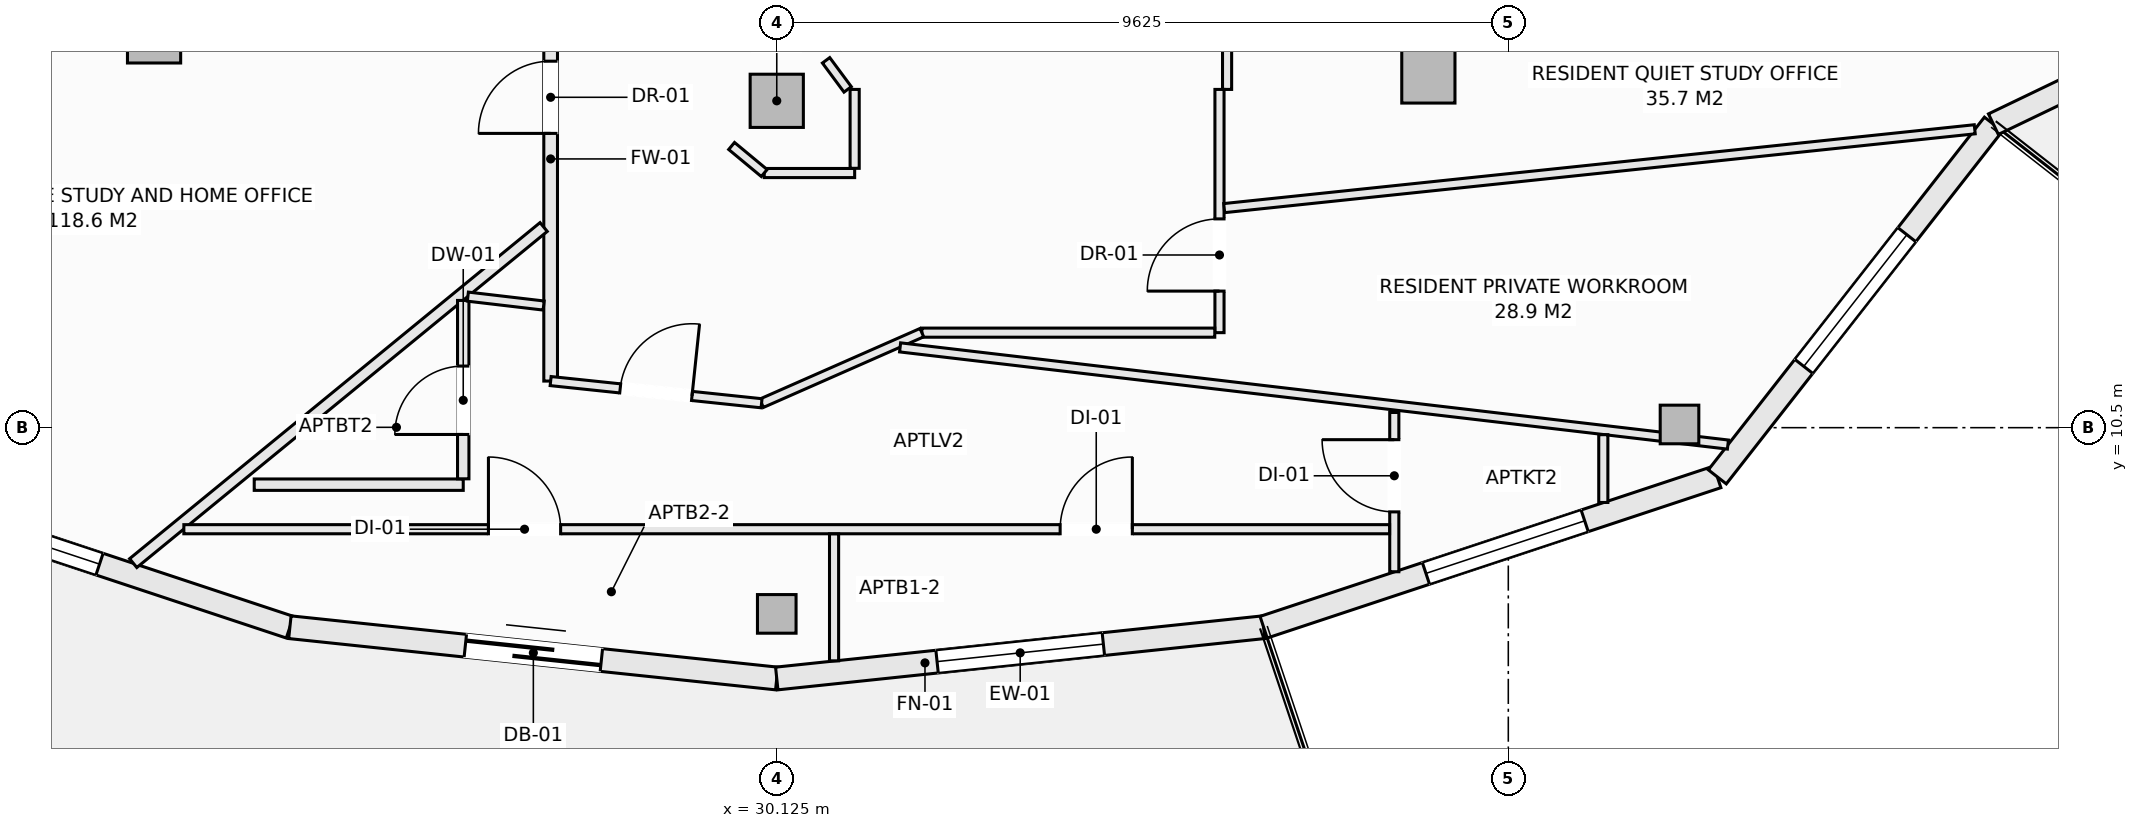
"""IFC4 building model, lengths in metres.
Left out: names, types, materials, properties, quantities, classifications, styles, units other than length and angle.
Written with IfcOpenShell. Run it as: python <this file> out.ifc"""

import sys

from ifc_helpers import new_model, si_unit, direction, frame, frame_2d, origin, origin_2d, place, context, subcontext, project, spatial, rectangle, hollow_rectangle, extrude, element, fill, save


model = new_model("IFC4")
c1 = context("Model", 3, precision=1e-05, world=origin(), true_north=direction((0.0, 1.0)))
c2 = subcontext(c1, "Body", "Model", "MODEL_VIEW")
j1 = project(units=[si_unit("LENGTHUNIT", "METRE"), si_unit("PLANEANGLEUNIT", "RADIAN")], contexts=[c1])
p1 = place(None, origin())
s1 = spatial("IfcSite", under=j1, at=p1, CompositionType="ELEMENT")
p2 = place(p1, origin())
s2 = spatial("IfcBuilding", under=s1, at=p2, CompositionType="ELEMENT")
p3 = place(p2, frame((0.0, 0.0, 216.2)))
s3 = spatial("IfcBuildingStorey", under=s2, at=p3, CompositionType="ELEMENT", Elevation=216.2)
for number, where, z_axis, x_axis in (
    (1, (30.125, 8.05, -0.27), (0.0, 0.0, 1.0), (1.0, 0.0, 0.0)),
    (2, (42.003, 10.542, -0.27), (0.0, 0.0, 1.0), (1.0, 0.0, 0.0)),
):
    element("IfcColumn", number, at=place(p3, frame(where, z_axis=z_axis, x_axis=x_axis)), inside=s3, PredefinedType="COLUMN", context=c2, shape_type="SweptSolid", body=[
        extrude(hollow_rectangle(XDim=0.508, YDim=0.508, WallThickness=0.019, at=origin_2d()), origin(), (0.0, 0.0, 1.0), 3.3),
    ])
for number, where, z_axis, x_axis in (
    (3, (21.932, 15.648, -0.27), (0.0, 0.0, 1.0), (1.0, 0.0, 0.0)),
    (4, (30.125, 14.8, -0.27), (0.0, 0.0, 1.0), (1.0, 0.0, 0.0)),
    (5, (38.698, 15.121, -0.27), (0.0, 0.0, 1.0), (1.0, 0.0, 0.0)),
):
    element("IfcColumn", number, at=place(p3, frame(where, z_axis=z_axis, x_axis=x_axis)), inside=s3, PredefinedType="COLUMN", context=c2, shape_type="SweptSolid", body=[
        extrude(rectangle(XDim=0.7, YDim=0.7, at=origin_2d()), origin(), (0.0, 0.0, 1.0), 3.3),
    ])
p4 = place(p3, frame((17.75, 9.853, 0.0), z_axis=(0.0, 0.0, 1.0), x_axis=(0.949240877604, -0.314550085495, 0.0)))
e6 = element("IfcWall", 6, at=p4, inside=s3, PredefinedType="SOLIDWALL", context=c2, shape_type="SweptSolid", body=[
    extrude(rectangle(XDim=6.288, YDim=0.3, at=frame_2d((3.144, 0.0))), origin(), (0.0, 0.0, 1.0), 2.605),
])
p5 = place(p4, frame((1.45, 0.0, 0.72)))
e7 = element("IfcOpeningElement", 7, at=p5, cuts=e6, PredefinedType="OPENING", context=c2, shape_type="SweptSolid", body=[
    extrude(rectangle(XDim=2.2, YDim=1.65, at=frame_2d((1.1, 0.825))), frame((0.0, 0.16, 0.0), z_axis=(0.0, -1.0, 0.0), x_axis=(1.0, 0.0, 0.0)), (0.0, 0.0, 1.0), 0.32),
])
p6 = place(p3, frame((23.719, 7.875, 0.0), z_axis=(0.0, 0.0, 1.0), x_axis=(0.994497142298, -0.104763705363, 0.0)))
e8 = element("IfcWall", 8, at=p6, inside=s3, PredefinedType="SOLIDWALL", context=c2, shape_type="SweptSolid", body=[
    extrude(rectangle(XDim=6.441, YDim=0.3, at=frame_2d((3.221, 0.0))), origin(), (0.0, 0.0, 1.0), 2.605),
])
p7 = place(p6, frame((2.321, 0.0, 0.0)))
e9 = element("IfcOpeningElement", 9, at=p7, cuts=e8, PredefinedType="OPENING", context=c2, shape_type="SweptSolid", body=[
    extrude(rectangle(XDim=1.8, YDim=2.25, at=frame_2d((0.9, 1.125))), frame((0.0, 0.16, 0.0), z_axis=(0.0, -1.0, 0.0), x_axis=(1.0, 0.0, 0.0)), (0.0, 0.0, 1.0), 0.32),
])
p8 = place(p3, frame((30.125, 7.2, 0.0), z_axis=(0.0, 0.0, 1.0), x_axis=(0.994497142298, 0.104763705363, 0.0)))
e10 = element("IfcWall", 10, at=p8, inside=s3, PredefinedType="SOLIDWALL", context=c2, shape_type="SweptSolid", body=[
    extrude(rectangle(XDim=6.441, YDim=0.3, at=frame_2d((3.221, 0.0))), origin(), (0.0, 0.0, 1.0), 2.605),
])
p9 = place(p8, frame((2.121, 0.0, 0.72)))
e11 = element("IfcOpeningElement", 11, at=p9, cuts=e10, PredefinedType="OPENING", context=c2, shape_type="SweptSolid", body=[
    extrude(rectangle(XDim=2.2, YDim=1.65, at=frame_2d((1.1, 0.825))), frame((0.0, 0.16, 0.0), z_axis=(0.0, -1.0, 0.0), x_axis=(1.0, 0.0, 0.0)), (0.0, 0.0, 1.0), 0.32),
])
p10 = place(p3, frame((36.531, 7.875, 0.0), z_axis=(0.0, 0.0, 1.0), x_axis=(0.949240877604, 0.314550085495, 0.0)))
e12 = element("IfcWall", 12, at=p10, inside=s3, PredefinedType="SOLIDWALL", context=c2, shape_type="SweptSolid", body=[
    extrude(rectangle(XDim=6.288, YDim=0.3, at=frame_2d((3.144, 0.0))), origin(), (0.0, 0.0, 1.0), 2.605),
])
p11 = place(p10, frame((2.25, 0.0, 0.72)))
e13 = element("IfcOpeningElement", 13, at=p11, cuts=e12, PredefinedType="OPENING", context=c2, shape_type="SweptSolid", body=[
    extrude(rectangle(XDim=2.2, YDim=1.65, at=frame_2d((1.1, 0.825))), frame((0.0, 0.16, 0.0), z_axis=(0.0, -1.0, 0.0), x_axis=(1.0, 0.0, 0.0)), (0.0, 0.0, 1.0), 0.32),
])
p12 = place(p3, frame((42.5, 9.853, 0.0), z_axis=(0.0, 0.0, 1.0), x_axis=(0.616450126935, 0.787393955401, 0.0)))
e14 = element("IfcWall", 14, at=p12, inside=s3, PredefinedType="SOLIDWALL", context=c2, shape_type="SweptSolid", body=[
    extrude(rectangle(XDim=5.893, YDim=0.3, at=frame_2d((2.946, 0.0))), origin(), (0.0, 0.0, 1.0), 2.605),
])
p13 = place(p12, frame((1.846, 0.0, 0.72)))
e15 = element("IfcOpeningElement", 15, at=p13, cuts=e14, PredefinedType="OPENING", context=c2, shape_type="SweptSolid", body=[
    extrude(rectangle(XDim=2.2, YDim=1.65, at=frame_2d((1.1, 0.825))), frame((0.0, 0.16, 0.0), z_axis=(0.0, -1.0, 0.0), x_axis=(1.0, 0.0, 0.0)), (0.0, 0.0, 1.0), 0.32),
])
p14 = place(p3, frame((46.133, 14.493, 0.0), z_axis=(0.0, 0.0, 1.0), x_axis=(0.901348331142, 0.433094892545, 0.0)))
e16 = element("IfcWall", 16, at=p14, inside=s3, PredefinedType="SOLIDWALL", context=c2, shape_type="SweptSolid", body=[
    extrude(rectangle(XDim=6.021, YDim=0.3, at=frame_2d((3.01, 0.0))), origin(), (0.0, 0.0, 1.0), 2.605),
])
p15 = place(p14, frame((2.45, 0.0, 0.72)))
e17 = element("IfcOpeningElement", 17, at=p15, cuts=e16, PredefinedType="OPENING", context=c2, shape_type="SweptSolid", body=[
    extrude(rectangle(XDim=2.2, YDim=1.65, at=frame_2d((1.1, 0.825))), frame((0.0, 0.16, 0.0), z_axis=(0.0, -1.0, 0.0), x_axis=(1.0, 0.0, 0.0)), (0.0, 0.0, 1.0), 0.32),
])
p16 = place(p3, frame((15.737, 7.134, 0.0), z_axis=(0.0, 0.0, 1.0), x_axis=(0.941780086523, -0.336229488042, 0.0)))
e18 = element("IfcWall", 18, at=p16, inside=s3, PredefinedType="PARAPET", context=c2, shape_type="SweptSolid", body=[
    extrude(rectangle(XDim=7.378, YDim=0.22, at=frame_2d((3.689, 0.0))), origin(), (0.0, 0.0, 1.0), 0.52),
])
p17 = place(p3, frame((27.15, 11.113, 0.0), z_axis=(0.0, 0.0, 1.0), x_axis=(0.0, 1.0, 0.0)))
e19 = element("IfcWall", 19, at=p17, inside=s3, PredefinedType="SOLIDWALL", context=c2, shape_type="SweptSolid", body=[
    extrude(rectangle(XDim=5.845, YDim=0.18, at=frame_2d((2.922, 0.0))), origin(), (0.0, 0.0, 1.0), 3.03),
])
p18 = place(p17, frame((3.258, 0.0, 0.0)))
e20 = element("IfcOpeningElement", 20, at=p18, cuts=e19, PredefinedType="OPENING", context=c2, shape_type="SweptSolid", body=[
    extrude(rectangle(XDim=0.95, YDim=2.1, at=frame_2d((0.475, 1.05))), frame((0.0, 0.1, 0.0), z_axis=(0.0, -1.0, 0.0), x_axis=(1.0, 0.0, 0.0)), (0.0, 0.0, 1.0), 0.2),
])
p19 = place(p3, frame((36.05, 14.95, 0.0), z_axis=(0.0, 0.0, 1.0), x_axis=(0.0, 1.0, 0.0)))
e21 = element("IfcWall", 21, at=p19, inside=s3, PredefinedType="PARTITIONING", context=c2, shape_type="SweptSolid", body=[
    extrude(rectangle(XDim=2.593, YDim=0.12, at=frame_2d((1.296, 0.0))), origin(), (0.0, 0.0, 1.0), 3.03),
])
p20 = place(p3, frame((35.95, 11.75, 0.0), z_axis=(0.0, 0.0, 1.0), x_axis=(0.0, 1.0, 0.0)))
e22 = element("IfcWall", 22, at=p20, inside=s3, PredefinedType="PARTITIONING", context=c2, shape_type="SweptSolid", body=[
    extrude(rectangle(XDim=3.2, YDim=0.12, at=frame_2d((1.6, 0.0))), origin(), (0.0, 0.0, 1.0), 3.03),
])
p21 = place(p20, frame((0.547, 0.0, 0.0)))
e23 = element("IfcOpeningElement", 23, at=p21, cuts=e22, PredefinedType="OPENING", context=c2, shape_type="SweptSolid", body=[
    extrude(rectangle(XDim=0.95, YDim=2.1, at=frame_2d((0.475, 1.05))), frame((0.0, 0.07, 0.0), z_axis=(0.0, -1.0, 0.0), x_axis=(1.0, 0.0, 0.0)), (0.0, 0.0, 1.0), 0.14),
])
p22 = place(p3, frame((32.034, 11.75, 0.0), z_axis=(0.0, 0.0, 1.0), x_axis=(1.0, 0.0, 0.0)))
e24 = element("IfcWall", 24, at=p22, inside=s3, PredefinedType="PARTITIONING", context=c2, shape_type="SweptSolid", body=[
    extrude(rectangle(XDim=3.854, YDim=0.12, at=frame_2d((1.927, 0.0))), origin(), (0.0, 0.0, 1.0), 3.03),
])
p23 = place(p3, frame((29.925, 10.821, 0.0), z_axis=(0.0, 0.0, 1.0), x_axis=(0.915147800009, 0.403118474072, 0.0)))
e25 = element("IfcWall", 25, at=p23, inside=s3, PredefinedType="PARTITIONING", context=c2, shape_type="SweptSolid", body=[
    extrude(rectangle(XDim=2.304, YDim=0.12, at=frame_2d((1.152, 0.0))), origin(), (0.0, 0.0, 1.0), 3.03),
])
p24 = place(p3, frame((27.15, 11.113, 0.0), z_axis=(0.0, 0.0, 1.0), x_axis=(0.994510245906, -0.104639241146, 0.0)))
e26 = element("IfcWall", 26, at=p24, inside=s3, PredefinedType="PARTITIONING", context=c2, shape_type="SweptSolid", body=[
    extrude(rectangle(XDim=2.791, YDim=0.12, at=frame_2d((1.395, 0.0))), origin(), (0.0, 0.0, 1.0), 3.03),
])
p25 = place(p24, frame((0.92, 0.0, 0.0)))
e27 = element("IfcOpeningElement", 27, at=p25, cuts=e26, PredefinedType="OPENING", context=c2, shape_type="SweptSolid", body=[
    extrude(rectangle(XDim=0.95, YDim=2.1, at=frame_2d((0.475, 1.05))), frame((0.0, 0.07, 0.0), z_axis=(0.0, -1.0, 0.0), x_axis=(1.0, 0.0, 0.0)), (0.0, 0.0, 1.0), 0.14),
])
p26 = place(p3, frame((29.96, 13.85, 0.0), z_axis=(0.0, 0.0, 1.0), x_axis=(1.0, 0.0, 0.0)))
e28 = element("IfcWall", 28, at=p26, inside=s3, PredefinedType="PARTITIONING", context=c2, shape_type="SweptSolid", body=[
    extrude(rectangle(XDim=1.19, YDim=0.12, at=frame_2d((0.595, 0.0))), origin(), (0.0, 0.0, 1.0), 3.03),
])
p27 = place(p3, frame((31.15, 13.912, 0.0), z_axis=(0.0, 0.0, 1.0), x_axis=(0.0, 1.0, 0.0)))
e29 = element("IfcWall", 29, at=p27, inside=s3, PredefinedType="PARTITIONING", context=c2, shape_type="SweptSolid", body=[
    extrude(rectangle(XDim=1.038, YDim=0.12, at=frame_2d((0.519, 0.0))), origin(), (0.0, 0.0, 1.0), 3.03),
])
p28 = place(p3, frame((30.774, 15.333, 0.0), z_axis=(0.0, 0.0, 1.0), x_axis=(0.595814974861, -0.803121731577, 0.0)))
e30 = element("IfcWall", 30, at=p28, inside=s3, PredefinedType="PARTITIONING", context=c2, shape_type="SweptSolid", body=[
    extrude(rectangle(XDim=0.477, YDim=0.12, at=frame_2d((0.239, 0.0))), origin(), (0.0, 0.0, 1.0), 3.03),
])
p29 = place(p3, frame((29.531, 14.206, 0.0), z_axis=(0.0, 0.0, 1.0), x_axis=(0.7695479554, -0.638589026166, 0.0)))
e31 = element("IfcWall", 31, at=p29, inside=s3, PredefinedType="PARTITIONING", context=c2, shape_type="SweptSolid", body=[
    extrude(rectangle(XDim=0.557, YDim=0.12, at=frame_2d((0.279, 0.0))), origin(), (0.0, 0.0, 1.0), 3.03),
])
p30 = place(p3, frame((21.658, 8.718, 0.0), z_axis=(0.0, 0.0, 1.0), x_axis=(0.773737507715, 0.633506329215, 0.0)))
e32 = element("IfcWall", 32, at=p30, inside=s3, PredefinedType="PARTITIONING", context=c2, shape_type="SweptSolid", body=[
    extrude(rectangle(XDim=6.98, YDim=0.15, at=frame_2d((3.49, 0.0))), origin(), (0.0, 0.0, 1.0), 2.77),
])
p31 = place(p3, frame((23.25, 9.75, 0.0), z_axis=(0.0, 0.0, 1.0), x_axis=(1.0, 0.0, 0.0)))
e33 = element("IfcWall", 33, at=p31, inside=s3, PredefinedType="PARTITIONING", context=c2, shape_type="SweptSolid", body=[
    extrude(rectangle(XDim=2.75, YDim=0.15, at=frame_2d((1.375, 0.0))), origin(), (0.0, 0.0, 1.0), 3.03),
])
p32 = place(p3, frame((26.0, 9.827, 0.0), z_axis=(0.0, 0.0, 1.0), x_axis=(0.0, 1.0, 0.0)))
e34 = element("IfcWall", 34, at=p32, inside=s3, PredefinedType="PARTITIONING", context=c2, shape_type="SweptSolid", body=[
    extrude(rectangle(XDim=2.347, YDim=0.15, at=frame_2d((1.173, 0.0))), origin(), (0.0, 0.0, 1.0), 3.03),
])
p33 = place(p32, frame((0.583, 0.0, 0.0)))
e35 = element("IfcOpeningElement", 35, at=p33, cuts=e34, PredefinedType="OPENING", context=c2, shape_type="SweptSolid", body=[
    extrude(rectangle(XDim=0.9, YDim=2.1, at=frame_2d((0.45, 1.05))), frame((0.0, 0.085, 0.0), z_axis=(0.0, -1.0, 0.0), x_axis=(1.0, 0.0, 0.0)), (0.0, 0.0, 1.0), 0.17),
])
p34 = place(p3, frame((26.061, 12.224, 0.0), z_axis=(0.0, 0.0, 1.0), x_axis=(0.993163877586, -0.11672836955, 0.0)))
e36 = element("IfcWall", 36, at=p34, inside=s3, PredefinedType="PARTITIONING", context=c2, shape_type="SweptSolid", body=[
    extrude(rectangle(XDim=1.004, YDim=0.12, at=frame_2d((0.502, 0.0))), origin(), (0.0, 0.0, 1.0), 3.03),
])
p35 = place(p3, frame((31.748, 11.556, 0.0), z_axis=(0.0, 0.0, 1.0), x_axis=(0.993180507835, -0.116586786801, 0.0)))
e37 = element("IfcWall", 37, at=p35, inside=s3, PredefinedType="PARTITIONING", context=c2, shape_type="SweptSolid", body=[
    extrude(rectangle(XDim=10.967, YDim=0.12, at=frame_2d((5.483, 0.0))), origin(), (0.0, 0.0, 1.0), 2.605),
])
p36 = place(p3, frame((38.25, 8.604, 0.0), z_axis=(0.0, 0.0, 1.0), x_axis=(0.0, 1.0, 0.0)))
e38 = element("IfcWall", 38, at=p36, inside=s3, PredefinedType="PARTITIONING", context=c2, shape_type="SweptSolid", body=[
    extrude(rectangle(XDim=2.095, YDim=0.12, at=frame_2d((1.048, 0.0))), origin(), (0.0, 0.0, 1.0), 3.03),
])
p37 = place(p36, frame((0.788, 0.0, 0.0)))
e39 = element("IfcOpeningElement", 39, at=p37, cuts=e38, PredefinedType="OPENING", context=c2, shape_type="SweptSolid", body=[
    extrude(rectangle(XDim=0.95, YDim=2.1, at=frame_2d((0.475, 1.05))), frame((0.0, 0.07, 0.0), z_axis=(0.0, -1.0, 0.0), x_axis=(1.0, 0.0, 0.0)), (0.0, 0.0, 1.0), 0.14),
])
p38 = place(p3, frame((22.324, 9.164, 0.0), z_axis=(0.0, 0.0, 1.0), x_axis=(1.0, 0.0, 0.0)))
e40 = element("IfcWall", 40, at=p38, inside=s3, PredefinedType="PARTITIONING", context=c2, shape_type="SweptSolid", body=[
    extrude(rectangle(XDim=15.864, YDim=0.12, at=frame_2d((7.932, 0.0))), origin(), (0.0, 0.0, 1.0), 2.605),
])
p39 = place(p38, frame((11.529, 0.0, 0.0)))
e41 = element("IfcOpeningElement", 41, at=p39, cuts=e40, PredefinedType="OPENING", context=c2, shape_type="SweptSolid", body=[
    extrude(rectangle(XDim=0.95, YDim=2.1, at=frame_2d((0.475, 1.05))), frame((0.0, 0.07, 0.0), z_axis=(0.0, -1.0, 0.0), x_axis=(1.0, 0.0, 0.0)), (0.0, 0.0, 1.0), 0.14),
])
p40 = place(p38, frame((4.007, 0.0, 0.0)))
e42 = element("IfcOpeningElement", 42, at=p40, cuts=e40, PredefinedType="OPENING", context=c2, shape_type="SweptSolid", body=[
    extrude(rectangle(XDim=0.95, YDim=2.1, at=frame_2d((0.475, 1.05))), frame((0.0, 0.07, 0.0), z_axis=(0.0, -1.0, 0.0), x_axis=(1.0, 0.0, 0.0)), (0.0, 0.0, 1.0), 0.14),
])
p41 = place(p3, frame((41.0, 9.516, 0.0), z_axis=(0.0, 0.0, 1.0), x_axis=(0.0, 1.0, 0.0)))
e43 = element("IfcWall", 43, at=p41, inside=s3, PredefinedType="PARTITIONING", context=c2, shape_type="SweptSolid", body=[
    extrude(rectangle(XDim=0.892, YDim=0.12, at=frame_2d((0.446, 0.0))), origin(), (0.0, 0.0, 1.0), 3.03),
])
p42 = place(p3, frame((30.879, 7.432, 0.0), z_axis=(0.0, 0.0, 1.0), x_axis=(0.0, 1.0, 0.0)))
e44 = element("IfcWall", 44, at=p42, inside=s3, PredefinedType="PARTITIONING", context=c2, shape_type="SweptSolid", body=[
    extrude(rectangle(XDim=1.67, YDim=0.12, at=frame_2d((0.835, 0.0))), origin(), (0.0, 0.0, 1.0), 3.03),
])
p43 = place(p3, frame((36.012, 13.388, 0.0), z_axis=(0.0, 0.0, 1.0), x_axis=(0.994530215, 0.104449276931, 0.0)))
e45 = element("IfcWall", 45, at=p43, inside=s3, PredefinedType="PARTITIONING", context=c2, shape_type="SweptSolid", body=[
    extrude(rectangle(XDim=9.929, YDim=0.12, at=frame_2d((4.965, 0.0))), origin(), (0.0, 0.0, 1.0), 3.03),
])
p44 = place(p5, origin())
e46 = element("IfcWindow", 46, at=p44, inside=s3, PartitioningType="SINGLE_PANEL", PredefinedType="WINDOW", context=c2, shape_type="SweptSolid", body=[
    extrude(rectangle(XDim=2.2, YDim=1.65, at=frame_2d((1.1, 0.825))), frame((0.0, 0.03, 0.0), z_axis=(0.0, -1.0, 0.0), x_axis=(1.0, 0.0, 0.0)), (0.0, 0.0, 1.0), 0.06),
])
fill(e7, e46)
p45 = place(p7, frame((1.8, 0.0, 0.0), z_axis=(0.0, 0.0, 1.0), x_axis=(-1.0, 0.0, 0.0)))
e47 = element("IfcDoor", 47, at=p45, inside=s3, OperationType="SLIDING_TO_LEFT", PredefinedType="DOOR", context=c2, shape_type="SweptSolid", body=[
    extrude(rectangle(XDim=1.8, YDim=2.25, at=frame_2d((0.9, 1.125))), frame((0.0, 0.025, 0.0), z_axis=(0.0, -1.0, 0.0), x_axis=(1.0, 0.0, 0.0)), (0.0, 0.0, 1.0), 0.05),
])
fill(e9, e47)
p46 = place(p9, origin())
e48 = element("IfcWindow", 48, at=p46, inside=s3, PartitioningType="SINGLE_PANEL", PredefinedType="WINDOW", context=c2, shape_type="SweptSolid", body=[
    extrude(rectangle(XDim=2.2, YDim=1.65, at=frame_2d((1.1, 0.825))), frame((0.0, 0.03, 0.0), z_axis=(0.0, -1.0, 0.0), x_axis=(1.0, 0.0, 0.0)), (0.0, 0.0, 1.0), 0.06),
])
fill(e11, e48)
p47 = place(p11, origin())
e49 = element("IfcWindow", 49, at=p47, inside=s3, PartitioningType="SINGLE_PANEL", PredefinedType="WINDOW", context=c2, shape_type="SweptSolid", body=[
    extrude(rectangle(XDim=2.2, YDim=1.65, at=frame_2d((1.1, 0.825))), frame((0.0, 0.03, 0.0), z_axis=(0.0, -1.0, 0.0), x_axis=(1.0, 0.0, 0.0)), (0.0, 0.0, 1.0), 0.06),
])
fill(e13, e49)
p48 = place(p13, origin())
e50 = element("IfcWindow", 50, at=p48, inside=s3, PartitioningType="SINGLE_PANEL", PredefinedType="WINDOW", context=c2, shape_type="SweptSolid", body=[
    extrude(rectangle(XDim=2.2, YDim=1.65, at=frame_2d((1.1, 0.825))), frame((0.0, 0.03, 0.0), z_axis=(0.0, -1.0, 0.0), x_axis=(1.0, 0.0, 0.0)), (0.0, 0.0, 1.0), 0.06),
])
fill(e15, e50)
p49 = place(p18, origin())
e51 = element("IfcDoor", 51, at=p49, inside=s3, OperationType="SINGLE_SWING_LEFT", PredefinedType="DOOR", context=c2, shape_type="SweptSolid", body=[
    extrude(rectangle(XDim=0.95, YDim=2.1, at=frame_2d((0.475, 1.05))), frame((0.0, 0.025, 0.0), z_axis=(0.0, -1.0, 0.0), x_axis=(1.0, 0.0, 0.0)), (0.0, 0.0, 1.0), 0.05),
])
fill(e20, e51)
p50 = place(p25, origin())
e52 = element("IfcDoor", 52, at=p50, inside=s3, OperationType="SINGLE_SWING_RIGHT", PredefinedType="DOOR", context=c2, shape_type="SweptSolid", body=[
    extrude(rectangle(XDim=0.95, YDim=2.1, at=frame_2d((0.475, 1.05))), frame((0.0, 0.025, 0.0), z_axis=(0.0, -1.0, 0.0), x_axis=(1.0, 0.0, 0.0)), (0.0, 0.0, 1.0), 0.05),
])
fill(e27, e52)
p51 = place(p21, origin())
e53 = element("IfcDoor", 53, at=p51, inside=s3, OperationType="SINGLE_SWING_LEFT", PredefinedType="DOOR", context=c2, shape_type="SweptSolid", body=[
    extrude(rectangle(XDim=0.95, YDim=2.1, at=frame_2d((0.475, 1.05))), frame((0.0, 0.025, 0.0), z_axis=(0.0, -1.0, 0.0), x_axis=(1.0, 0.0, 0.0)), (0.0, 0.0, 1.0), 0.05),
])
fill(e23, e53)
p52 = place(p37, origin())
e54 = element("IfcDoor", 54, at=p52, inside=s3, OperationType="SINGLE_SWING_RIGHT", PredefinedType="DOOR", context=c2, shape_type="SweptSolid", body=[
    extrude(rectangle(XDim=0.95, YDim=2.1, at=frame_2d((0.475, 1.05))), frame((0.0, 0.025, 0.0), z_axis=(0.0, -1.0, 0.0), x_axis=(1.0, 0.0, 0.0)), (0.0, 0.0, 1.0), 0.05),
])
fill(e39, e54)
p53 = place(p33, origin())
e55 = element("IfcDoor", 55, at=p53, inside=s3, OperationType="SINGLE_SWING_LEFT", PredefinedType="DOOR", context=c2, shape_type="SweptSolid", body=[
    extrude(rectangle(XDim=0.9, YDim=2.1, at=frame_2d((0.45, 1.05))), frame((0.0, 0.025, 0.0), z_axis=(0.0, -1.0, 0.0), x_axis=(1.0, 0.0, 0.0)), (0.0, 0.0, 1.0), 0.05),
])
fill(e35, e55)
p54 = place(p39, origin())
e56 = element("IfcDoor", 56, at=p54, inside=s3, OperationType="SINGLE_SWING_RIGHT", PredefinedType="DOOR", context=c2, shape_type="SweptSolid", body=[
    extrude(rectangle(XDim=0.95, YDim=2.1, at=frame_2d((0.475, 1.05))), frame((0.0, 0.025, 0.0), z_axis=(0.0, -1.0, 0.0), x_axis=(1.0, 0.0, 0.0)), (0.0, 0.0, 1.0), 0.05),
])
fill(e41, e56)
p55 = place(p40, origin())
e57 = element("IfcDoor", 57, at=p55, inside=s3, OperationType="SINGLE_SWING_LEFT", PredefinedType="DOOR", context=c2, shape_type="SweptSolid", body=[
    extrude(rectangle(XDim=0.95, YDim=2.1, at=frame_2d((0.475, 1.05))), frame((0.0, 0.025, 0.0), z_axis=(0.0, -1.0, 0.0), x_axis=(1.0, 0.0, 0.0)), (0.0, 0.0, 1.0), 0.05),
])
fill(e42, e57)
save(model, sys.argv[1])
